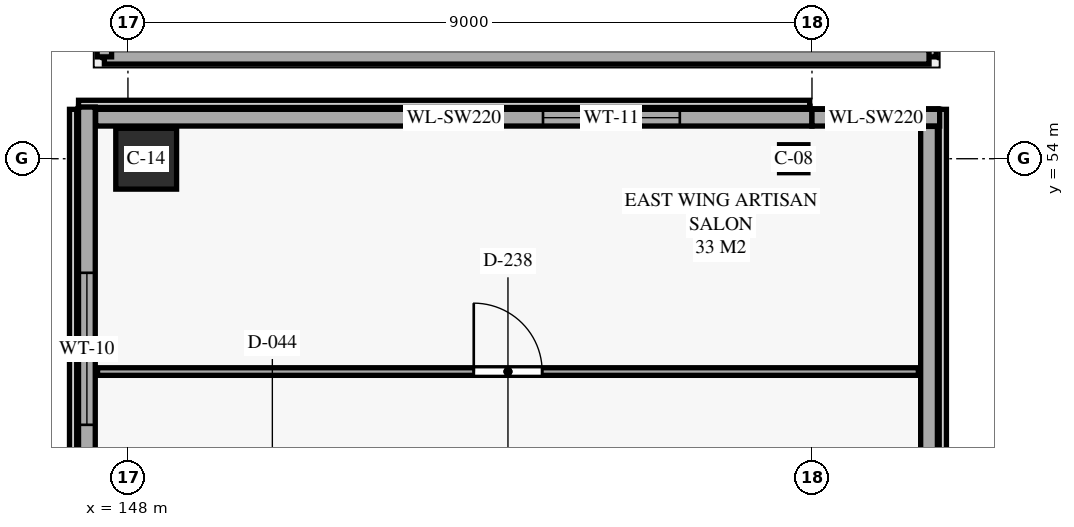
"""IFC4 building model, lengths in metres.
Left out: names, types, materials, properties, quantities, classifications, styles, units other than length and angle.
Written with IfcOpenShell. Run it as: python <this file> out.ifc"""

import sys

from ifc_helpers import new_model, si_unit, direction, frame, frame_2d, origin, origin_2d, place, context, subcontext, project, spatial, rectangle, i_section, extrude, element, fill, save


model = new_model("IFC4")
c1 = context("Model", 3, precision=1e-05, world=origin(), true_north=direction((0.0, 1.0)))
c2 = subcontext(c1, "Body", "Model", "MODEL_VIEW")
j1 = project(units=[si_unit("LENGTHUNIT", "METRE"), si_unit("PLANEANGLEUNIT", "RADIAN")], contexts=[c1])
p1 = place(None, origin())
s1 = spatial("IfcSite", under=j1, at=p1, CompositionType="ELEMENT")
p2 = place(p1, origin())
s2 = spatial("IfcBuilding", under=s1, at=p2, CompositionType="ELEMENT")
p3 = place(p2, frame((0.0, 0.0, 20.0)))
s3 = spatial("IfcBuildingStorey", under=s2, at=p3, CompositionType="ELEMENT", Elevation=20.0)
p4 = place(p3, frame((148.24, 54.0, 0.0), z_axis=(0.0, 0.0, 1.0), x_axis=(1.0, 0.0, 0.0)))
e1 = element("IfcColumn", 1, at=p4, inside=s3, PredefinedType="COLUMN", context=c2, shape_type="SweptSolid", body=[
    extrude(rectangle(XDim=0.8, YDim=0.8, at=origin_2d()), origin(), (0.0, 0.0, 1.0), 4.51),
])
p5 = place(p3, frame((156.76, 54.0, 0.0), z_axis=(0.0, 0.0, 1.0), x_axis=(1.0, 0.0, 0.0)))
e2 = element("IfcColumn", 2, at=p5, inside=s3, PredefinedType="COLUMN", context=c2, shape_type="SweptSolid", body=[
    extrude(i_section(OverallWidth=0.373, OverallDepth=0.368, WebThickness=0.015, FlangeThickness=0.024, FilletRadius=0.015, at=origin_2d()), origin(), (0.0, 0.0, 1.0), 4.51),
])
p6 = place(p3, frame((147.46, 43.32, 0.0), z_axis=(0.0, 0.0, 1.0), x_axis=(0.0, 1.0, 0.0)))
e3 = element("IfcWall", 3, at=p6, inside=s3, PredefinedType="SOLIDWALL", context=c2, shape_type="SweptSolid", body=[
    extrude(rectangle(XDim=11.36, YDim=0.22, at=frame_2d((5.68, 0.0))), origin(), (0.0, 0.0, 1.0), 4.51),
])
p7 = place(p6, frame((2.081, 0.0, 0.65)))
e4 = element("IfcOpeningElement", 4, at=p7, cuts=e3, PredefinedType="OPENING", context=c2, shape_type="SweptSolid", body=[
    extrude(rectangle(XDim=2.2, YDim=2.05, at=frame_2d((1.1, 1.025))), frame((0.0, 0.12, 0.0), z_axis=(0.0, -1.0, 0.0), x_axis=(1.0, 0.0, 0.0)), (0.0, 0.0, 1.0), 0.24),
])
p8 = place(p6, frame((7.179, 0.0, 0.65)))
e5 = element("IfcOpeningElement", 5, at=p8, cuts=e3, PredefinedType="OPENING", context=c2, shape_type="SweptSolid", body=[
    extrude(rectangle(XDim=2.0, YDim=2.05, at=frame_2d((1.0, 1.025))), frame((0.0, 0.12, 0.0), z_axis=(0.0, -1.0, 0.0), x_axis=(1.0, 0.0, 0.0)), (0.0, 0.0, 1.0), 0.24),
])
p9 = place(p3, frame((147.575, 54.54, 0.0), z_axis=(0.0, 0.0, 1.0), x_axis=(1.0, 0.0, 0.0)))
e6 = element("IfcWall", 6, at=p9, inside=s3, PredefinedType="SOLIDWALL", context=c2, shape_type="SweptSolid", body=[
    extrude(rectangle(XDim=9.425, YDim=0.22, at=frame_2d((4.712, 0.0))), origin(), (0.0, 0.0, 1.0), 4.51),
])
p10 = place(p9, frame((5.886, 0.0, 0.65)))
e7 = element("IfcOpeningElement", 7, at=p10, cuts=e6, PredefinedType="OPENING", context=c2, shape_type="SweptSolid", body=[
    extrude(rectangle(XDim=1.8, YDim=2.05, at=frame_2d((0.9, 1.025))), frame((0.0, 0.12, 0.0), z_axis=(0.0, -1.0, 0.0), x_axis=(1.0, 0.0, 0.0)), (0.0, 0.0, 1.0), 0.24),
])
p11 = place(p3, frame((157.0, 54.54, 0.0), z_axis=(0.0, 0.0, 1.0), x_axis=(1.0, 0.0, 0.0)))
e8 = element("IfcWall", 8, at=p11, inside=s3, PredefinedType="SOLIDWALL", context=c2, shape_type="SweptSolid", body=[
    extrude(rectangle(XDim=1.68, YDim=0.22, at=frame_2d((0.84, 0.0))), origin(), (0.0, 0.0, 1.0), 4.51),
])
p12 = place(p3, frame((158.54, 54.425, 0.0), z_axis=(0.0, 0.0, 1.0), x_axis=(0.0, -1.0, 0.0)))
e9 = element("IfcWall", 9, at=p12, inside=s3, PredefinedType="SOLIDWALL", context=c2, shape_type="SweptSolid", body=[
    extrude(rectangle(XDim=10.85, YDim=0.22, at=frame_2d((5.425, 0.0))), origin(), (0.0, 0.0, 1.0), 4.51),
])
p13 = place(p3, frame((158.54, 83.86, 0.0), z_axis=(0.0, 0.0, 1.0), x_axis=(0.0, -1.0, 0.0)))
e10 = element("IfcWall", 10, at=p13, inside=s3, PredefinedType="PARAPET", context=c2, shape_type="SweptSolid", body=[
    extrude(rectangle(XDim=28.52, YDim=0.19, at=frame_2d((14.26, 0.0))), origin(), (0.0, 0.0, 1.0), 0.95),
])
p14 = place(p3, frame((158.54, 55.34, 0.0), z_axis=(0.0, 0.0, 1.0), x_axis=(-1.0, 0.0, 0.0)))
e11 = element("IfcWall", 11, at=p14, inside=s3, PredefinedType="PARAPET", context=c2, shape_type="SweptSolid", body=[
    extrude(rectangle(XDim=10.85, YDim=0.19, at=frame_2d((5.425, 0.0))), origin(), (0.0, 0.0, 1.0), 0.95),
])
p15 = place(p3, frame((147.69, 55.34, 0.0), z_axis=(0.0, 0.0, 1.0), x_axis=(0.0, 1.0, 0.0)))
e12 = element("IfcWall", 12, at=p15, inside=s3, PredefinedType="PARAPET", context=c2, shape_type="SweptSolid", body=[
    extrude(rectangle(XDim=28.52, YDim=0.19, at=frame_2d((14.26, 0.0))), origin(), (0.0, 0.0, 1.0), 0.95),
])
p16 = place(p3, frame((147.6, 51.2, 0.0), z_axis=(0.0, 0.0, 1.0), x_axis=(1.0, 0.0, 0.0)))
e13 = element("IfcWall", 13, at=p16, inside=s3, PredefinedType="PARTITIONING", context=c2, shape_type="SweptSolid", body=[
    extrude(rectangle(XDim=10.8, YDim=0.1, at=frame_2d((5.4, 0.0))), origin(), (0.0, 0.0, 1.0), 4.51),
])
p17 = place(p16, frame((4.95, 0.0, 0.0)))
e14 = element("IfcOpeningElement", 14, at=p17, cuts=e13, PredefinedType="OPENING", context=c2, shape_type="SweptSolid", body=[
    extrude(rectangle(XDim=0.9, YDim=2.15, at=frame_2d((0.45, 1.075))), frame((0.0, 0.06, 0.0), z_axis=(0.0, -1.0, 0.0), x_axis=(1.0, 0.0, 0.0)), (0.0, 0.0, 1.0), 0.12),
])
p18 = place(p8, origin())
e15 = element("IfcWindow", 15, at=p18, inside=s3, PartitioningType="SINGLE_PANEL", PredefinedType="WINDOW", context=c2, shape_type="SweptSolid", body=[
    extrude(rectangle(XDim=2.0, YDim=2.05, at=frame_2d((1.0, 1.025))), frame((0.0, 0.03, 0.0), z_axis=(0.0, -1.0, 0.0), x_axis=(1.0, 0.0, 0.0)), (0.0, 0.0, 1.0), 0.06),
])
fill(e5, e15)
p19 = place(p10, origin())
e16 = element("IfcWindow", 16, at=p19, inside=s3, PartitioningType="SINGLE_PANEL", PredefinedType="WINDOW", context=c2, shape_type="SweptSolid", body=[
    extrude(rectangle(XDim=1.8, YDim=2.05, at=frame_2d((0.9, 1.025))), frame((0.0, 0.03, 0.0), z_axis=(0.0, -1.0, 0.0), x_axis=(1.0, 0.0, 0.0)), (0.0, 0.0, 1.0), 0.06),
])
fill(e7, e16)
p20 = place(p17, origin())
e17 = element("IfcDoor", 17, at=p20, inside=s3, OperationType="SINGLE_SWING_LEFT", PredefinedType="DOOR", context=c2, shape_type="SweptSolid", body=[
    extrude(rectangle(XDim=0.9, YDim=2.15, at=frame_2d((0.45, 1.075))), frame((0.0, 0.025, 0.0), z_axis=(0.0, -1.0, 0.0), x_axis=(1.0, 0.0, 0.0)), (0.0, 0.0, 1.0), 0.05),
])
fill(e14, e17)
save(model, sys.argv[1])
